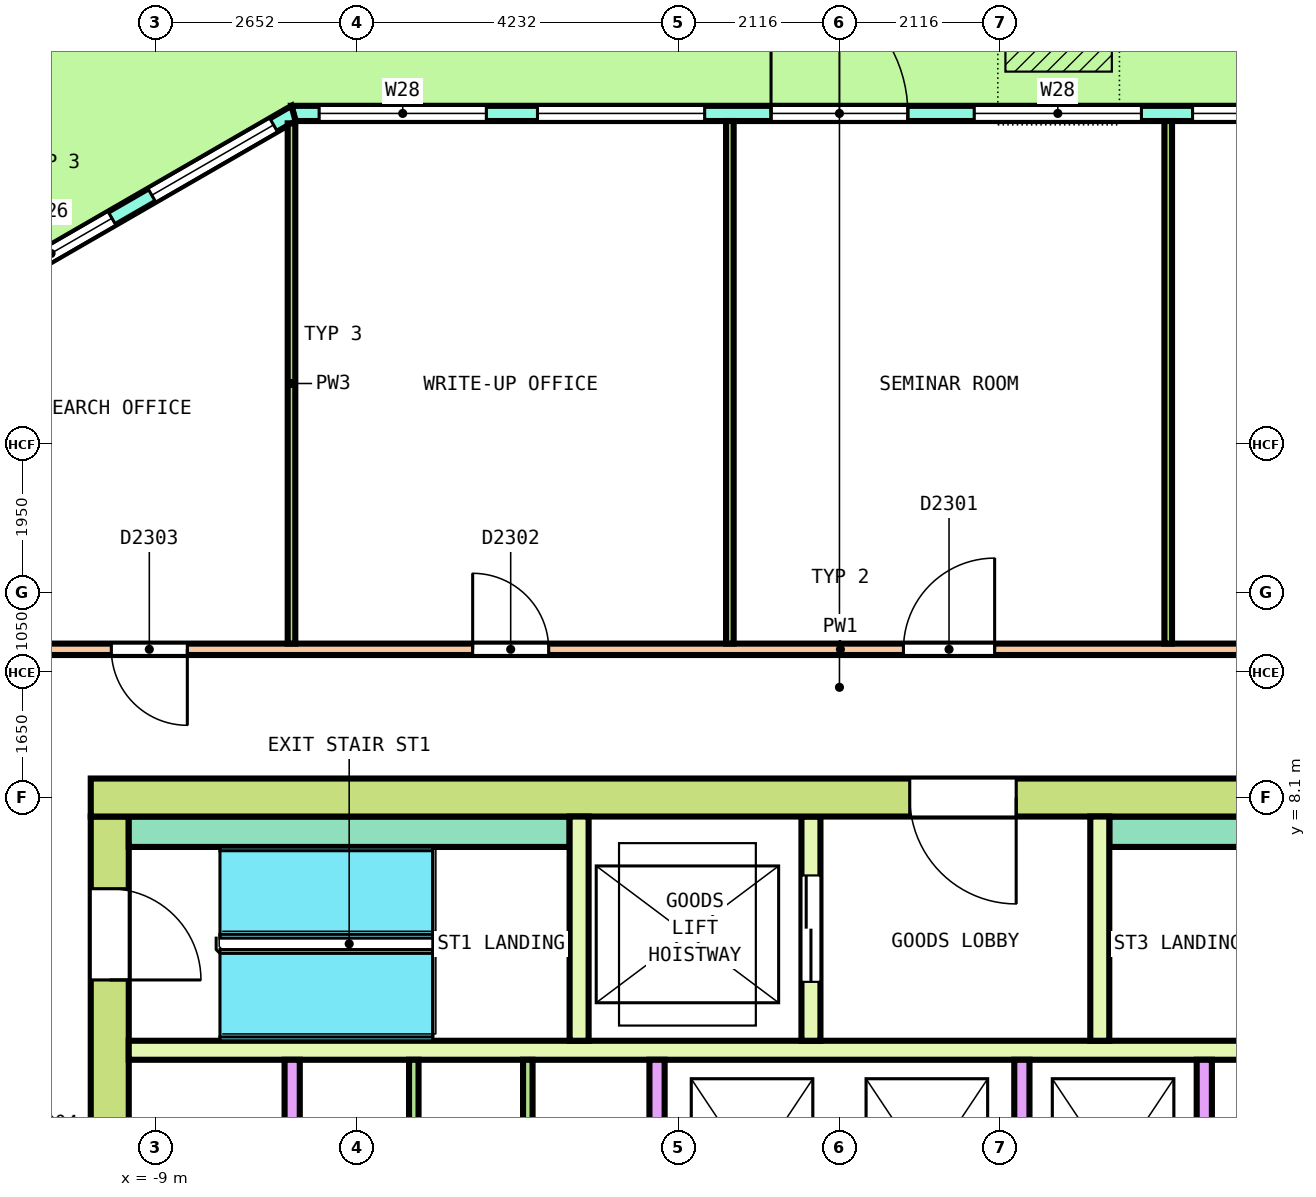
"""IFC4 building model, lengths in metres.
Left out: names, types, materials, properties, quantities, classifications, styles, units other than length and angle.
Written with IfcOpenShell. Run it as: python <this file> out.ifc"""

import sys

from ifc_helpers import new_model, si_unit, direction, frame, frame_2d, origin, origin_2d, place, context, subcontext, project, spatial, polyline, rectangle, outline, extrude, element, fill, save


model = new_model("IFC4")
c1 = context("Model", 3, precision=1e-05, world=origin(), true_north=direction((0.0, 1.0)))
c2 = subcontext(c1, "Body", "Model", "MODEL_VIEW")
j1 = project(units=[si_unit("LENGTHUNIT", "METRE"), si_unit("PLANEANGLEUNIT", "RADIAN")], contexts=[c1])
p1 = place(None, origin())
s1 = spatial("IfcSite", under=j1, at=p1, CompositionType="ELEMENT")
p2 = place(p1, origin())
s2 = spatial("IfcBuilding", under=s1, at=p2, CompositionType="ELEMENT")
p3 = place(p2, frame((0.0, 0.0, 312.6)))
s3 = spatial("IfcBuildingStorey", under=s2, at=p3, CompositionType="ELEMENT", Elevation=312.6)
p4 = place(p3, frame((-10.709, 18.297, 0.0), z_axis=(-0.036230378439, 0.0, 0.99934346432), x_axis=(-0.865314641241, -0.500246354177, -0.031371273281)))
e1 = element("IfcColumn", 1, at=p4, inside=s3, PredefinedType="COLUMN", context=c2, shape_type="SweptSolid", body=[
    extrude(rectangle(XDim=0.85, YDim=0.85, at=origin_2d()), origin(), (0.0, 0.0, 1.0), 3.652),
])
p5 = place(p3, frame((7.182, 17.1, 0.0), z_axis=(0.0, 0.0, 1.0), x_axis=(-1.0, 0.0, 0.0)))
e2 = element("IfcWall", 2, at=p5, inside=s3, PredefinedType="SOLIDWALL", context=c2, shape_type="SweptSolid", body=[
    extrude(outline(polyline([(-0.027, -0.1), (1.003, -0.1), (2.033, -0.1), (3.063, -0.1), (4.093, -0.1), (5.122, -0.1), (6.152, -0.1), (7.182, -0.1), (8.212, -0.1), (9.242, -0.1), (10.272, -0.1), (11.302, -0.1), (12.331, -0.1), (13.361, -0.1), (14.391, -0.1), (14.337, 0.1), (13.315, 0.1), (12.293, 0.1), (11.271, 0.1), (10.249, 0.1), (9.227, 0.1), (8.204, 0.1), (7.182, 0.1), (6.16, 0.1), (5.138, 0.1), (4.115, 0.1), (3.094, 0.1), (2.071, 0.1), (1.049, 0.1), (0.027, 0.1), (-0.027, -0.1)])), origin(), (0.0, 0.0, 1.0), 3.7),
])
p6 = place(p5, frame((0.336, 0.0, 0.1)))
e3 = element("IfcOpeningElement", 3, at=p6, cuts=e2, PredefinedType="OPENING", context=c2, shape_type="SweptSolid", body=[
    extrude(rectangle(XDim=2.2, YDim=2.9, at=frame_2d((1.1, 1.45))), frame((0.0, 0.11, 0.0), z_axis=(0.0, -1.0, 0.0), x_axis=(1.0, 0.0, 0.0)), (0.0, 0.0, 1.0), 0.22),
])
p7 = place(p5, frame((3.209, 0.0, 0.1)))
e4 = element("IfcOpeningElement", 4, at=p7, cuts=e2, PredefinedType="OPENING", context=c2, shape_type="SweptSolid", body=[
    extrude(rectangle(XDim=2.2, YDim=2.9, at=frame_2d((1.1, 1.45))), frame((0.0, 0.11, 0.0), z_axis=(0.0, -1.0, 0.0), x_axis=(1.0, 0.0, 0.0)), (0.0, 0.0, 1.0), 0.22),
])
p8 = place(p5, frame((6.282, 0.0, 0.0)))
e5 = element("IfcOpeningElement", 5, at=p8, cuts=e2, PredefinedType="OPENING", context=c2, shape_type="SweptSolid", body=[
    extrude(rectangle(XDim=1.8, YDim=2.4, at=frame_2d((0.9, 1.2))), frame((0.0, 0.11, 0.0), z_axis=(0.0, -1.0, 0.0), x_axis=(1.0, 0.0, 0.0)), (0.0, 0.0, 1.0), 0.22),
])
p9 = place(p5, frame((6.282, 0.0, 2.55)))
e6 = element("IfcOpeningElement", 6, at=p9, cuts=e2, PredefinedType="OPENING", context=c2, shape_type="SweptSolid", body=[
    extrude(rectangle(XDim=1.8, YDim=0.45, at=frame_2d((0.9, 0.225))), frame((0.0, 0.11, 0.0), z_axis=(0.0, -1.0, 0.0), x_axis=(1.0, 0.0, 0.0)), (0.0, 0.0, 1.0), 0.22),
])
p10 = place(p5, frame((8.955, 0.0, 0.1)))
e7 = element("IfcOpeningElement", 7, at=p10, cuts=e2, PredefinedType="OPENING", context=c2, shape_type="SweptSolid", body=[
    extrude(rectangle(XDim=2.2, YDim=2.9, at=frame_2d((1.1, 1.45))), frame((0.0, 0.11, 0.0), z_axis=(0.0, -1.0, 0.0), x_axis=(1.0, 0.0, 0.0)), (0.0, 0.0, 1.0), 0.22),
])
p11 = place(p5, frame((11.828, 0.0, 0.1)))
e8 = element("IfcOpeningElement", 8, at=p11, cuts=e2, PredefinedType="OPENING", context=c2, shape_type="SweptSolid", body=[
    extrude(rectangle(XDim=2.2, YDim=2.9, at=frame_2d((1.1, 1.45))), frame((0.0, 0.11, 0.0), z_axis=(0.0, -1.0, 0.0), x_axis=(1.0, 0.0, 0.0)), (0.0, 0.0, 1.0), 0.22),
])
p12 = place(p3, frame((-7.182, 17.1, 0.0), z_axis=(0.0, 0.0, 1.0), x_axis=(-0.866029143232, -0.499993523031, 0.0)))
e9 = element("IfcWall", 9, at=p12, inside=s3, PredefinedType="SOLIDWALL", context=c2, shape_type="SweptSolid", body=[
    extrude(outline(polyline([(-0.027, -0.1), (1.214, -0.1), (2.456, -0.1), (3.697, -0.1), (4.938, -0.1), (4.885, 0.1), (3.67, 0.1), (2.456, 0.1), (1.241, 0.1), (0.027, 0.1), (-0.027, -0.1)])), origin(), (0.0, 0.0, 1.0), 3.7),
])
p13 = place(p12, frame((0.303, 0.0, 0.1)))
e10 = element("IfcOpeningElement", 10, at=p13, cuts=e9, PredefinedType="OPENING", context=c2, shape_type="SweptSolid", body=[
    extrude(rectangle(XDim=1.85, YDim=2.9, at=frame_2d((0.925, 1.45))), frame((0.0, 0.11, 0.0), z_axis=(0.0, -1.0, 0.0), x_axis=(1.0, 0.0, 0.0)), (0.0, 0.0, 1.0), 0.22),
])
p14 = place(p12, frame((2.759, 0.0, 0.1)))
e11 = element("IfcOpeningElement", 11, at=p14, cuts=e9, PredefinedType="OPENING", context=c2, shape_type="SweptSolid", body=[
    extrude(rectangle(XDim=1.85, YDim=2.9, at=frame_2d((0.925, 1.45))), frame((0.0, 0.11, 0.0), z_axis=(0.0, -1.0, 0.0), x_axis=(1.0, 0.0, 0.0)), (0.0, 0.0, 1.0), 0.22),
])
p15 = place(p3, frame((-9.85, 8.1, 0.0), z_axis=(0.0, 0.0, 1.0), x_axis=(1.0, 0.0, 0.0)))
e12 = element("IfcWall", 12, at=p15, inside=s3, PredefinedType="SHEAR", context=c2, shape_type="SweptSolid", body=[
    extrude(rectangle(XDim=19.7, YDim=0.5, at=frame_2d((9.85, 0.0))), origin(), (0.0, 0.0, 1.0), 3.7),
])
p16 = place(p15, frame((10.775, 0.0, 0.0)))
e13 = element("IfcOpeningElement", 13, at=p16, cuts=e12, PredefinedType="OPENING", context=c2, shape_type="SweptSolid", body=[
    extrude(rectangle(XDim=1.4, YDim=2.1, at=frame_2d((0.7, 1.05))), frame((0.0, 0.26, 0.0), z_axis=(0.0, -1.0, 0.0), x_axis=(1.0, 0.0, 0.0)), (0.0, 0.0, 1.0), 0.52),
])
p17 = place(p3, frame((-9.6, -7.85, 0.0), z_axis=(0.0, 0.0, 1.0), x_axis=(0.0, 1.0, 0.0)))
e14 = element("IfcWall", 14, at=p17, inside=s3, PredefinedType="SHEAR", context=c2, shape_type="SweptSolid", body=[
    extrude(rectangle(XDim=15.7, YDim=0.5, at=frame_2d((7.85, 0.0))), origin(), (0.0, 0.0, 1.0), 3.7),
])
p18 = place(p17, frame((6.65, 0.0, 0.0)))
e15 = element("IfcOpeningElement", 15, at=p18, cuts=e14, PredefinedType="OPENING", context=c2, shape_type="SweptSolid", body=[
    extrude(rectangle(XDim=2.4, YDim=2.1, at=frame_2d((1.2, 1.05))), frame((0.0, 0.26, 0.0), z_axis=(0.0, -1.0, 0.0), x_axis=(1.0, 0.0, 0.0)), (0.0, 0.0, 1.0), 0.52),
])
p19 = place(p17, frame((13.55, 0.0, 0.0)))
e16 = element("IfcOpeningElement", 16, at=p19, cuts=e14, PredefinedType="OPENING", context=c2, shape_type="SweptSolid", body=[
    extrude(rectangle(XDim=1.2, YDim=2.1, at=frame_2d((0.6, 1.05))), frame((0.0, 0.26, 0.0), z_axis=(0.0, -1.0, 0.0), x_axis=(1.0, 0.0, 0.0)), (0.0, 0.0, 1.0), 0.52),
])
p20 = place(p17, frame((0.95, 0.0, 0.0)))
e17 = element("IfcOpeningElement", 17, at=p20, cuts=e14, PredefinedType="OPENING", context=c2, shape_type="SweptSolid", body=[
    extrude(rectangle(XDim=1.2, YDim=2.1, at=frame_2d((0.6, 1.05))), frame((0.0, 0.26, 0.0), z_axis=(0.0, -1.0, 0.0), x_axis=(1.0, 0.0, 0.0)), (0.0, 0.0, 1.0), 0.52),
])
p21 = place(p3, frame((-9.35, 4.775, 0.0), z_axis=(0.0, 0.0, 1.0), x_axis=(1.0, 0.0, 0.0)))
e18 = element("IfcWall", 18, at=p21, inside=s3, PredefinedType="SOLIDWALL", context=c2, shape_type="SweptSolid", body=[
    extrude(rectangle(XDim=18.7, YDim=0.25, at=frame_2d((9.35, 0.0))), origin(), (0.0, 0.0, 1.0), 3.7),
])
for number, where, z_axis, x_axis in (
    (19, (-7.2, 1.75, 0.0), (0.0, 0.0, 1.0), (0.0, 1.0, 0.0)),
    (20, (-2.4, 1.75, 0.0), (0.0, 0.0, 1.0), (0.0, 1.0, 0.0)),
    (21, (2.4, 1.75, 0.0), (0.0, 0.0, 1.0), (0.0, 1.0, 0.0)),
    (22, (4.8, 1.75, 0.0), (0.0, 0.0, 1.0), (0.0, 1.0, 0.0)),
):
    element("IfcWall", number, at=place(p3, frame(where, z_axis=z_axis, x_axis=x_axis)), inside=s3, PredefinedType="SOLIDWALL", context=c2, shape_type="SweptSolid", body=[
        extrude(rectangle(XDim=2.9, YDim=0.2, at=frame_2d((1.45, 0.0))), origin(), (0.0, 0.0, 1.0), 3.7),
    ])
for number, where, z_axis, x_axis in (
    (23, (-9.35, 7.65, 0.0), (0.0, 0.0, 1.0), (1.0, 0.0, 0.0)),
    (24, (3.55, 7.65, 0.0), (0.0, 0.0, 1.0), (1.0, 0.0, 0.0)),
):
    element("IfcWall", number, at=place(p3, frame(where, z_axis=z_axis, x_axis=x_axis)), inside=s3, PredefinedType="SOLIDWALL", context=c2, shape_type="SweptSolid", body=[
        extrude(rectangle(XDim=5.8, YDim=0.4, at=frame_2d((2.9, 0.0))), origin(), (0.0, 0.0, 1.0), 3.7),
    ])
p22 = place(p3, frame((-3.425, 4.9, 0.0), z_axis=(0.0, 0.0, 1.0), x_axis=(0.0, 1.0, 0.0)))
e25 = element("IfcWall", 25, at=p22, inside=s3, PredefinedType="SOLIDWALL", context=c2, shape_type="SweptSolid", body=[
    extrude(rectangle(XDim=2.95, YDim=0.25, at=frame_2d((1.475, 0.0))), origin(), (0.0, 0.0, 1.0), 3.7),
])
p23 = place(p3, frame((-0.375, 4.9, 0.0), z_axis=(0.0, 0.0, 1.0), x_axis=(0.0, 1.0, 0.0)))
e26 = element("IfcWall", 26, at=p23, inside=s3, PredefinedType="SOLIDWALL", context=c2, shape_type="SweptSolid", body=[
    extrude(rectangle(XDim=2.95, YDim=0.25, at=frame_2d((1.475, 0.0))), origin(), (0.0, 0.0, 1.0), 3.7),
])
p24 = place(p23, frame((0.775, 0.0, 0.0)))
e27 = element("IfcOpeningElement", 27, at=p24, cuts=e26, PredefinedType="OPENING", context=c2, shape_type="SweptSolid", body=[
    extrude(rectangle(XDim=1.4, YDim=2.1, at=frame_2d((0.7, 1.05))), frame((0.0, 0.135, 0.0), z_axis=(0.0, -1.0, 0.0), x_axis=(1.0, 0.0, 0.0)), (0.0, 0.0, 1.0), 0.27),
])
p25 = place(p3, frame((3.425, 4.9, 0.0), z_axis=(0.0, 0.0, 1.0), x_axis=(0.0, 1.0, 0.0)))
e28 = element("IfcWall", 28, at=p25, inside=s3, PredefinedType="SOLIDWALL", context=c2, shape_type="SweptSolid", body=[
    extrude(rectangle(XDim=2.95, YDim=0.25, at=frame_2d((1.475, 0.0))), origin(), (0.0, 0.0, 1.0), 3.7),
])
for number, where, z_axis, x_axis in (
    (29, (-5.6, 1.75, 0.0), (0.0, 0.0, 1.0), (0.0, 1.0, 0.0)),
    (30, (-4.1, 1.75, 0.0), (0.0, 0.0, 1.0), (0.0, 1.0, 0.0)),
):
    element("IfcWall", number, at=place(p3, frame(where, z_axis=z_axis, x_axis=x_axis)), inside=s3, PredefinedType="PARTITIONING", context=c2, shape_type="SweptSolid", body=[
        extrude(rectangle(XDim=2.9, YDim=0.125, at=frame_2d((1.45, 0.0))), origin(), (0.0, 0.0, 1.0), 3.7),
    ])
p26 = place(p3, frame((-10.875, 10.05, 0.0), z_axis=(0.0, 0.0, 1.0), x_axis=(1.0, 0.0, 0.0)))
e31 = element("IfcWall", 31, at=p26, inside=s3, PredefinedType="PARTITIONING", context=c2, shape_type="SweptSolid", body=[
    extrude(rectangle(XDim=21.775, YDim=0.15, at=frame_2d((10.887, 0.0))), origin(), (0.0, 0.0, 1.0), 3.05),
])
p27 = place(p26, frame((17.204, 0.0, 0.0)))
e32 = element("IfcOpeningElement", 32, at=p27, cuts=e31, PredefinedType="OPENING", context=c2, shape_type="SweptSolid", body=[
    extrude(rectangle(XDim=1.2, YDim=2.1, at=frame_2d((0.6, 1.05))), frame((0.0, 0.085, 0.0), z_axis=(0.0, -1.0, 0.0), x_axis=(1.0, 0.0, 0.0)), (0.0, 0.0, 1.0), 0.17),
])
p28 = place(p26, frame((11.717, 0.0, 0.0)))
e33 = element("IfcOpeningElement", 33, at=p28, cuts=e31, PredefinedType="OPENING", context=c2, shape_type="SweptSolid", body=[
    extrude(rectangle(XDim=1.2, YDim=2.1, at=frame_2d((0.6, 1.05))), frame((0.0, 0.085, 0.0), z_axis=(0.0, -1.0, 0.0), x_axis=(1.0, 0.0, 0.0)), (0.0, 0.0, 1.0), 0.17),
])
p29 = place(p26, frame((6.05, 0.0, 0.0)))
e34 = element("IfcOpeningElement", 34, at=p29, cuts=e31, PredefinedType="OPENING", context=c2, shape_type="SweptSolid", body=[
    extrude(rectangle(XDim=1.0, YDim=2.1, at=frame_2d((0.5, 1.05))), frame((0.0, 0.085, 0.0), z_axis=(0.0, -1.0, 0.0), x_axis=(1.0, 0.0, 0.0)), (0.0, 0.0, 1.0), 0.17),
])
p30 = place(p26, frame((1.295, 0.0, 0.0)))
e35 = element("IfcOpeningElement", 35, at=p30, cuts=e31, PredefinedType="OPENING", context=c2, shape_type="SweptSolid", body=[
    extrude(rectangle(XDim=1.0, YDim=2.1, at=frame_2d((0.5, 1.05))), frame((0.0, 0.085, 0.0), z_axis=(0.0, -1.0, 0.0), x_axis=(1.0, 0.0, 0.0)), (0.0, 0.0, 1.0), 0.17),
])
for number, where, z_axis, x_axis in (
    (36, (4.325, 10.125, 0.0), (0.0, 0.0, 1.0), (0.0, 1.0, 0.0)),
    (37, (-1.442, 10.125, 0.0), (0.0, 0.0, 1.0), (0.0, 1.0, 0.0)),
):
    element("IfcWall", number, at=place(p3, frame(where, z_axis=z_axis, x_axis=x_axis)), inside=s3, PredefinedType="PARTITIONING", context=c2, shape_type="SweptSolid", body=[
        extrude(rectangle(XDim=6.875, YDim=0.1, at=frame_2d((3.438, 0.0))), origin(), (0.0, 0.0, 1.0), 3.05),
    ])
p31 = place(p3, frame((-7.209, 10.125, 0.0), z_axis=(0.0, 0.0, 1.0), x_axis=(0.0, 1.0, 0.0)))
e38 = element("IfcWall", 38, at=p31, inside=s3, PredefinedType="PARTITIONING", context=c2, shape_type="SweptSolid", body=[
    extrude(rectangle(XDim=6.844, YDim=0.1, at=frame_2d((3.422, 0.0))), origin(), (0.0, 0.0, 1.0), 3.05),
])
p32 = place(p6, origin())
e39 = element("IfcWindow", 39, at=p32, inside=s3, PartitioningType="SINGLE_PANEL", PredefinedType="WINDOW", context=c2, shape_type="SweptSolid", body=[
    extrude(rectangle(XDim=2.2, YDim=2.9, at=frame_2d((1.1, 1.45))), frame((0.0, 0.03, 0.0), z_axis=(0.0, -1.0, 0.0), x_axis=(1.0, 0.0, 0.0)), (0.0, 0.0, 1.0), 0.06),
])
fill(e3, e39)
p33 = place(p7, origin())
e40 = element("IfcWindow", 40, at=p33, inside=s3, PartitioningType="SINGLE_PANEL", PredefinedType="WINDOW", context=c2, shape_type="SweptSolid", body=[
    extrude(rectangle(XDim=2.2, YDim=2.9, at=frame_2d((1.1, 1.45))), frame((0.0, 0.03, 0.0), z_axis=(0.0, -1.0, 0.0), x_axis=(1.0, 0.0, 0.0)), (0.0, 0.0, 1.0), 0.06),
])
fill(e4, e40)
p34 = place(p8, origin())
e41 = element("IfcDoor", 41, at=p34, inside=s3, OperationType="DOUBLE_DOOR_SINGLE_SWING", PredefinedType="DOOR", context=c2, shape_type="SweptSolid", body=[
    extrude(rectangle(XDim=1.8, YDim=2.4, at=frame_2d((0.9, 1.2))), frame((0.0, 0.025, 0.0), z_axis=(0.0, -1.0, 0.0), x_axis=(1.0, 0.0, 0.0)), (0.0, 0.0, 1.0), 0.05),
])
fill(e5, e41)
p35 = place(p9, origin())
e42 = element("IfcWindow", 42, at=p35, inside=s3, PartitioningType="SINGLE_PANEL", PredefinedType="WINDOW", context=c2, shape_type="SweptSolid", body=[
    extrude(rectangle(XDim=1.8, YDim=0.45, at=frame_2d((0.9, 0.225))), frame((0.0, 0.03, 0.0), z_axis=(0.0, -1.0, 0.0), x_axis=(1.0, 0.0, 0.0)), (0.0, 0.0, 1.0), 0.06),
])
fill(e6, e42)
p36 = place(p10, origin())
e43 = element("IfcWindow", 43, at=p36, inside=s3, PartitioningType="SINGLE_PANEL", PredefinedType="WINDOW", context=c2, shape_type="SweptSolid", body=[
    extrude(rectangle(XDim=2.2, YDim=2.9, at=frame_2d((1.1, 1.45))), frame((0.0, 0.03, 0.0), z_axis=(0.0, -1.0, 0.0), x_axis=(1.0, 0.0, 0.0)), (0.0, 0.0, 1.0), 0.06),
])
fill(e7, e43)
p37 = place(p11, origin())
e44 = element("IfcWindow", 44, at=p37, inside=s3, PartitioningType="SINGLE_PANEL", PredefinedType="WINDOW", context=c2, shape_type="SweptSolid", body=[
    extrude(rectangle(XDim=2.2, YDim=2.9, at=frame_2d((1.1, 1.45))), frame((0.0, 0.03, 0.0), z_axis=(0.0, -1.0, 0.0), x_axis=(1.0, 0.0, 0.0)), (0.0, 0.0, 1.0), 0.06),
])
fill(e8, e44)
p38 = place(p13, origin())
e45 = element("IfcWindow", 45, at=p38, inside=s3, PartitioningType="SINGLE_PANEL", PredefinedType="WINDOW", context=c2, shape_type="SweptSolid", body=[
    extrude(rectangle(XDim=1.85, YDim=2.9, at=frame_2d((0.925, 1.45))), frame((0.0, 0.03, 0.0), z_axis=(0.0, -1.0, 0.0), x_axis=(1.0, 0.0, 0.0)), (0.0, 0.0, 1.0), 0.06),
])
fill(e10, e45)
p39 = place(p14, origin())
e46 = element("IfcWindow", 46, at=p39, inside=s3, PartitioningType="SINGLE_PANEL", PredefinedType="WINDOW", context=c2, shape_type="SweptSolid", body=[
    extrude(rectangle(XDim=1.85, YDim=2.9, at=frame_2d((0.925, 1.45))), frame((0.0, 0.03, 0.0), z_axis=(0.0, -1.0, 0.0), x_axis=(1.0, 0.0, 0.0)), (0.0, 0.0, 1.0), 0.06),
])
fill(e11, e46)
p40 = place(p24, origin())
e47 = element("IfcDoor", 47, at=p40, inside=s3, OperationType="DOUBLE_DOOR_SLIDING", PredefinedType="DOOR", context=c2, shape_type="SweptSolid", body=[
    extrude(rectangle(XDim=1.4, YDim=2.1, at=frame_2d((0.7, 1.05))), frame((0.0, 0.075, 0.0), z_axis=(0.0, -1.0, 0.0), x_axis=(1.0, 0.0, 0.0)), (0.0, 0.0, 1.0), 0.15),
])
fill(e27, e47)
p41 = place(p19, origin())
e48 = element("IfcDoor", 48, at=p41, inside=s3, OperationType="SINGLE_SWING_RIGHT", PredefinedType="DOOR", context=c2, shape_type="SweptSolid", body=[
    extrude(rectangle(XDim=1.2, YDim=2.1, at=frame_2d((0.6, 1.05))), frame((0.0, 0.2, 0.0), z_axis=(0.0, -1.0, 0.0), x_axis=(1.0, 0.0, 0.0)), (0.0, 0.0, 1.0), 0.4),
])
fill(e16, e48)
p42 = place(p16, origin())
e49 = element("IfcDoor", 49, at=p42, inside=s3, OperationType="DOUBLE_DOOR_SINGLE_SWING", PredefinedType="DOOR", context=c2, shape_type="SweptSolid", body=[
    extrude(rectangle(XDim=1.4, YDim=2.1, at=frame_2d((0.7, 1.05))), frame((0.0, 0.2, 0.0), z_axis=(0.0, -1.0, 0.0), x_axis=(1.0, 0.0, 0.0)), (0.0, 0.0, 1.0), 0.4),
])
fill(e13, e49)
p43 = place(p28, origin())
e50 = element("IfcDoor", 50, at=p43, inside=s3, OperationType="DOUBLE_DOOR_SINGLE_SWING", PredefinedType="DOOR", context=c2, shape_type="SweptSolid", body=[
    extrude(rectangle(XDim=1.2, YDim=2.1, at=frame_2d((0.6, 1.05))), frame((0.0, 0.025, 0.0), z_axis=(0.0, -1.0, 0.0), x_axis=(1.0, 0.0, 0.0)), (0.0, 0.0, 1.0), 0.05),
])
fill(e33, e50)
p44 = place(p29, origin())
e51 = element("IfcDoor", 51, at=p44, inside=s3, OperationType="SINGLE_SWING_LEFT", PredefinedType="DOOR", context=c2, shape_type="SweptSolid", body=[
    extrude(rectangle(XDim=1.0, YDim=2.1, at=frame_2d((0.5, 1.05))), frame((0.0, 0.025, 0.0), z_axis=(0.0, -1.0, 0.0), x_axis=(1.0, 0.0, 0.0)), (0.0, 0.0, 1.0), 0.05),
])
fill(e34, e51)
p45 = place(p30, origin())
e52 = element("IfcDoor", 52, at=p45, inside=s3, OperationType="SINGLE_SWING_LEFT", PredefinedType="DOOR", context=c2, shape_type="SweptSolid", body=[
    extrude(rectangle(XDim=1.0, YDim=2.1, at=frame_2d((0.5, 1.05))), frame((0.0, 0.025, 0.0), z_axis=(0.0, -1.0, 0.0), x_axis=(1.0, 0.0, 0.0)), (0.0, 0.0, 1.0), 0.05),
])
fill(e35, e52)
save(model, sys.argv[1])
